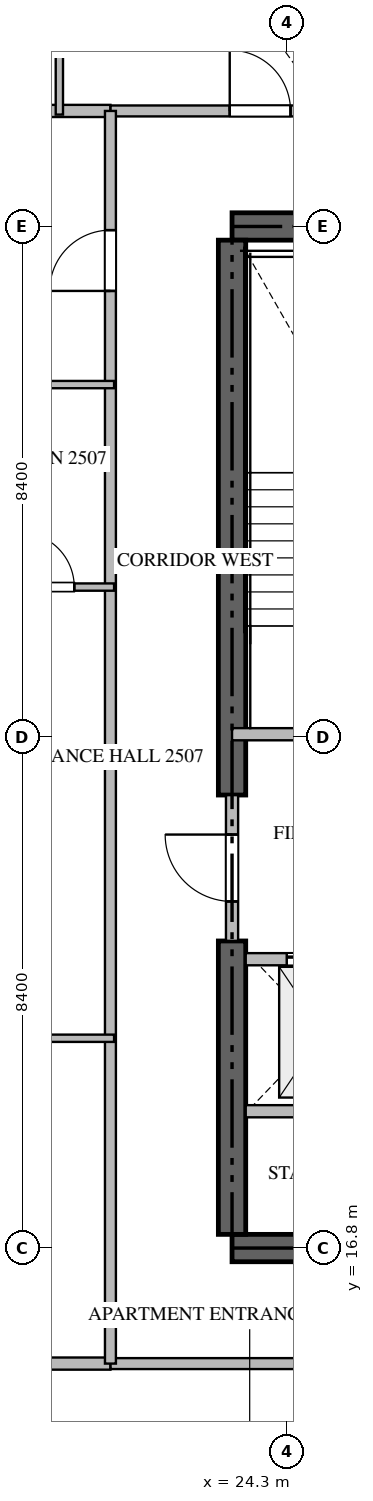
"""IFC4 building model, lengths in metres.
Left out: names, types, materials, properties, quantities, classifications, styles, units other than length and angle.
Written with IfcOpenShell. Run it as: python <this file> out.ifc"""

import sys

from ifc_helpers import new_model, si_unit, direction, frame, frame_2d, origin, place, context, subcontext, project, spatial, rectangle, extrude, source, transform, mapped, element, fill, save


model = new_model("IFC4")
c1 = context("Model", 3, precision=1e-05, world=origin(), true_north=direction((0.0, 1.0)))
c2 = subcontext(c1, "Body", "Model", "MODEL_VIEW")
j1 = project(units=[si_unit("LENGTHUNIT", "METRE"), si_unit("PLANEANGLEUNIT", "RADIAN")], contexts=[c1])
p1 = place(None, origin())
s1 = spatial("IfcSite", under=j1, at=p1, CompositionType="ELEMENT")
p2 = place(p1, origin())
s2 = spatial("IfcBuilding", under=s1, at=p2, CompositionType="ELEMENT")
p3 = place(p2, frame((0.0, 0.0, 101.7)))
s3 = spatial("IfcBuildingStorey", under=s2, at=p3, CompositionType="ELEMENT", Elevation=101.7)
for number, where, z_axis, x_axis in (
    (1, (23.4, 16.8, -0.26), (0.0, 0.0, 1.0), (1.0, 0.0, 0.0)),
    (2, (41.4, 33.6, -0.26), (0.0, 0.0, 1.0), (-1.0, 0.0, 0.0)),
):
    element("IfcWall", number, at=place(p3, frame(where, z_axis=z_axis, x_axis=x_axis)), inside=s3, PredefinedType="SHEAR", context=c2, shape_type="SweptSolid", body=[
        extrude(rectangle(XDim=18.0, YDim=0.45, at=frame_2d((9.0, 0.0))), origin(), (0.0, 0.0, 1.0), 3.748),
    ])
p4 = place(p3, frame((23.4, 17.025, -0.26), z_axis=(0.0, 0.0, 1.0), x_axis=(0.0, 1.0, 0.0)))
e3 = element("IfcWall", 3, at=p4, inside=s3, PredefinedType="SHEAR", context=c2, shape_type="SweptSolid", body=[
    extrude(rectangle(XDim=4.825, YDim=0.45, at=frame_2d((2.413, 0.0))), origin(), (0.0, 0.0, 1.0), 3.748),
])
p5 = place(p3, frame((23.4, 24.25, -0.26), z_axis=(0.0, 0.0, 1.0), x_axis=(0.0, 1.0, 0.0)))
e4 = element("IfcWall", 4, at=p5, inside=s3, PredefinedType="SHEAR", context=c2, shape_type="SweptSolid", body=[
    extrude(rectangle(XDim=9.125, YDim=0.45, at=frame_2d((4.562, 0.0))), origin(), (0.0, 0.0, 1.0), 3.748),
])
p6 = place(p3, frame((23.4, 25.25, 0.0), z_axis=(0.0, 0.0, 1.0), x_axis=(1.0, 0.0, 0.0)))
e5 = element("IfcWall", 5, at=p6, inside=s3, PredefinedType="STANDARD", context=c2, shape_type="SweptSolid", body=[
    extrude(rectangle(XDim=4.45, YDim=0.2, at=frame_2d((2.225, 0.0))), origin(), (0.0, 0.0, 1.0), 3.49),
])
p7 = place(p6, frame((1.65, 0.0, 0.0)))
e6 = element("IfcOpeningElement", 6, at=p7, cuts=e5, PredefinedType="OPENING", context=c2, shape_type="SweptSolid", body=[
    extrude(rectangle(XDim=1.1, YDim=2.15, at=frame_2d((0.55, 1.075))), frame((0.0, 0.11, 0.0), z_axis=(0.0, -1.0, 0.0), x_axis=(1.0, 0.0, 0.0)), (0.0, 0.0, 1.0), 0.22),
])
p8 = place(p3, frame((23.625, 21.55, 0.0), z_axis=(0.0, 0.0, 1.0), x_axis=(1.0, 0.0, 0.0)))
e7 = element("IfcWall", 7, at=p8, inside=s3, PredefinedType="STANDARD", context=c2, shape_type="SweptSolid", body=[
    extrude(rectangle(XDim=2.425, YDim=0.2, at=frame_2d((1.212, 0.0))), origin(), (0.0, 0.0, 1.0), 3.49),
])
p9 = place(p8, frame((0.675, 0.0, 0.0)))
e8 = element("IfcOpeningElement", 8, at=p9, cuts=e7, PredefinedType="OPENING", context=c2, shape_type="SweptSolid", body=[
    extrude(rectangle(XDim=1.2, YDim=2.2, at=frame_2d((0.6, 1.1))), frame((0.0, 0.11, 0.0), z_axis=(0.0, -1.0, 0.0), x_axis=(1.0, 0.0, 0.0)), (0.0, 0.0, 1.0), 0.22),
])
p10 = place(p3, frame((23.625, 19.05, 0.0), z_axis=(0.0, 0.0, 1.0), x_axis=(1.0, 0.0, 0.0)))
e9 = element("IfcWall", 9, at=p10, inside=s3, PredefinedType="STANDARD", context=c2, shape_type="SweptSolid", body=[
    extrude(rectangle(XDim=2.425, YDim=0.2, at=frame_2d((1.212, 0.0))), origin(), (0.0, 0.0, 1.0), 3.49),
])
p11 = place(p3, frame((23.4, 21.852, 0.0), z_axis=(0.0, 0.0, 1.0), x_axis=(0.0, 1.0, 0.0)))
e10 = element("IfcWall", 10, at=p11, inside=s3, PredefinedType="STANDARD", context=c2, shape_type="SweptSolid", body=[
    extrude(rectangle(XDim=2.396, YDim=0.2, at=frame_2d((1.198, 0.0))), origin(), (0.0, 0.0, 1.0), 3.49),
])
p12 = place(p11, frame((0.648, 0.0, 0.0)))
e11 = element("IfcOpeningElement", 11, at=p12, cuts=e10, PredefinedType="OPENING", context=c2, shape_type="SweptSolid", body=[
    extrude(rectangle(XDim=1.1, YDim=2.15, at=frame_2d((0.55, 1.075))), frame((0.0, 0.11, 0.0), z_axis=(0.0, -1.0, 0.0), x_axis=(1.0, 0.0, 0.0)), (0.0, 0.0, 1.0), 0.22),
])
for number, where, z_axis, x_axis in (
    (12, (6.082, 14.9, 0.0), (0.0, 0.0, 1.0), (1.0, 0.0, 0.0)),
    (13, (6.082, 35.5, 0.0), (0.0, 0.0, 1.0), (1.0, 0.0, 0.0)),
):
    element("IfcWall", number, at=place(p3, frame(where, z_axis=z_axis, x_axis=x_axis)), inside=s3, PredefinedType="PARTITIONING", context=c2, shape_type="SweptSolid", body=[
        extrude(rectangle(XDim=15.318, YDim=0.2, at=frame_2d((7.659, 0.0))), origin(), (0.0, 0.0, 1.0), 3.49),
    ])
p13 = place(p3, frame((21.402, 14.9, 0.0), z_axis=(0.0, 0.0, 1.0), x_axis=(1.0, 0.0, 0.0)))
e14 = element("IfcWall", 14, at=p13, inside=s3, PredefinedType="PARTITIONING", context=c2, shape_type="SweptSolid", body=[
    extrude(rectangle(XDim=21.996, YDim=0.18, at=frame_2d((10.998, 0.0))), origin(), (0.0, 0.0, 1.0), 3.49),
])
p14 = place(p13, frame((10.351, 0.0, 0.0)))
e15 = element("IfcOpeningElement", 15, at=p14, cuts=e14, PredefinedType="OPENING", context=c2, shape_type="SweptSolid", body=[
    extrude(rectangle(XDim=1.0, YDim=2.15, at=frame_2d((0.5, 1.075))), frame((0.0, 0.1, 0.0), z_axis=(0.0, -1.0, 0.0), x_axis=(1.0, 0.0, 0.0)), (0.0, 0.0, 1.0), 0.2),
])
p15 = place(p13, frame((15.978, 0.0, 0.0)))
e16 = element("IfcOpeningElement", 16, at=p15, cuts=e14, PredefinedType="OPENING", context=c2, shape_type="SweptSolid", body=[
    extrude(rectangle(XDim=1.0, YDim=2.15, at=frame_2d((0.5, 1.075))), frame((0.0, 0.1, 0.0), z_axis=(0.0, -1.0, 0.0), x_axis=(1.0, 0.0, 0.0)), (0.0, 0.0, 1.0), 0.2),
])
p16 = place(p3, frame((21.402, 35.5, 0.0), z_axis=(0.0, 0.0, 1.0), x_axis=(1.0, 0.0, 0.0)))
e17 = element("IfcWall", 17, at=p16, inside=s3, PredefinedType="PARTITIONING", context=c2, shape_type="SweptSolid", body=[
    extrude(rectangle(XDim=21.996, YDim=0.18, at=frame_2d((10.998, 0.0))), origin(), (0.0, 0.0, 1.0), 3.49),
])
p17 = place(p16, frame((1.96, 0.0, 0.0)))
e18 = element("IfcOpeningElement", 18, at=p17, cuts=e17, PredefinedType="OPENING", context=c2, shape_type="SweptSolid", body=[
    extrude(rectangle(XDim=1.0, YDim=2.15, at=frame_2d((0.5, 1.075))), frame((0.0, 0.1, 0.0), z_axis=(0.0, -1.0, 0.0), x_axis=(1.0, 0.0, 0.0)), (0.0, 0.0, 1.0), 0.2),
])
p18 = place(p16, frame((5.249, 0.0, 0.0)))
e19 = element("IfcOpeningElement", 19, at=p18, cuts=e17, PredefinedType="OPENING", context=c2, shape_type="SweptSolid", body=[
    extrude(rectangle(XDim=1.0, YDim=2.15, at=frame_2d((0.5, 1.075))), frame((0.0, 0.1, 0.0), z_axis=(0.0, -1.0, 0.0), x_axis=(1.0, 0.0, 0.0)), (0.0, 0.0, 1.0), 0.2),
])
p19 = place(p16, frame((11.653, 0.0, 0.0)))
e20 = element("IfcOpeningElement", 20, at=p19, cuts=e17, PredefinedType="OPENING", context=c2, shape_type="SweptSolid", body=[
    extrude(rectangle(XDim=1.0, YDim=2.15, at=frame_2d((0.5, 1.075))), frame((0.0, 0.1, 0.0), z_axis=(0.0, -1.0, 0.0), x_axis=(1.0, 0.0, 0.0)), (0.0, 0.0, 1.0), 0.2),
])
p20 = place(p16, frame((18.896, 0.0, 0.0)))
e21 = element("IfcOpeningElement", 21, at=p20, cuts=e17, PredefinedType="OPENING", context=c2, shape_type="SweptSolid", body=[
    extrude(rectangle(XDim=1.0, YDim=2.15, at=frame_2d((0.5, 1.075))), frame((0.0, 0.1, 0.0), z_axis=(0.0, -1.0, 0.0), x_axis=(1.0, 0.0, 0.0)), (0.0, 0.0, 1.0), 0.2),
])
p21 = place(p3, frame((21.4, 14.9, 0.0), z_axis=(0.0, 0.0, 1.0), x_axis=(0.0, 1.0, 0.0)))
e22 = element("IfcWall", 22, at=p21, inside=s3, PredefinedType="PARTITIONING", context=c2, shape_type="SweptSolid", body=[
    extrude(rectangle(XDim=20.6, YDim=0.18, at=frame_2d((10.3, 0.0))), origin(), (0.0, 0.0, 1.0), 3.49),
])
p22 = place(p21, frame((17.64, 0.0, 0.0)))
e23 = element("IfcOpeningElement", 23, at=p22, cuts=e22, PredefinedType="OPENING", context=c2, shape_type="SweptSolid", body=[
    extrude(rectangle(XDim=1.0, YDim=2.15, at=frame_2d((0.5, 1.075))), frame((0.0, 0.1, 0.0), z_axis=(0.0, -1.0, 0.0), x_axis=(1.0, 0.0, 0.0)), (0.0, 0.0, 1.0), 0.2),
])
for number, where, z_axis, x_axis in (
    (24, (20.56, 38.25, 0.0), (0.0, 0.0, 1.0), (0.0, -1.0, 0.0)),
    (25, (18.65, 31.0, 0.0), (0.0, 0.0, 1.0), (1.0, 0.0, 0.0)),
):
    element("IfcWall", number, at=place(p3, frame(where, z_axis=z_axis, x_axis=x_axis)), inside=s3, PredefinedType="PARTITIONING", context=c2, shape_type="SweptSolid", body=[
        extrude(rectangle(XDim=2.81, YDim=0.12, at=frame_2d((1.405, 0.0))), origin(), (0.0, 0.0, 1.0), 3.49),
    ])
p23 = place(p3, frame((19.25, 27.67, 0.0), z_axis=(0.0, 0.0, 1.0), x_axis=(1.0, 0.0, 0.0)))
e26 = element("IfcWall", 26, at=p23, inside=s3, PredefinedType="PARTITIONING", context=c2, shape_type="SweptSolid", body=[
    extrude(rectangle(XDim=2.21, YDim=0.12, at=frame_2d((1.105, 0.0))), origin(), (0.0, 0.0, 1.0), 3.49),
])
p24 = place(p23, frame((0.655, 0.0, 0.0)))
e27 = element("IfcOpeningElement", 27, at=p24, cuts=e26, PredefinedType="OPENING", context=c2, shape_type="SweptSolid", body=[
    extrude(rectangle(XDim=0.9, YDim=2.1, at=frame_2d((0.45, 1.05))), frame((0.0, 0.07, 0.0), z_axis=(0.0, -1.0, 0.0), x_axis=(1.0, 0.0, 0.0)), (0.0, 0.0, 1.0), 0.14),
])
p25 = place(p3, frame((19.252, 20.25, 0.0), z_axis=(0.0, 0.0, 1.0), x_axis=(1.0, 0.0, 0.0)))
e28 = element("IfcWall", 28, at=p25, inside=s3, PredefinedType="PARTITIONING", context=c2, shape_type="SweptSolid", body=[
    extrude(rectangle(XDim=2.208, YDim=0.12, at=frame_2d((1.104, 0.0))), origin(), (0.0, 0.0, 1.0), 3.49),
])
m1 = source(origin(), c2, "Body", "SweptSolid", [
    extrude(rectangle(XDim=1.2, YDim=2.2, at=frame_2d((0.6, 1.1))), frame((0.0, 0.025, 0.0), z_axis=(0.0, -1.0, 0.0), x_axis=(1.0, 0.0, 0.0)), (0.0, 0.0, 1.0), 0.05),
])
p26 = place(p9, origin())
e29 = element("IfcDoor", 29, at=p26, inside=s3, OperationType="DOUBLE_DOOR_SLIDING", PredefinedType="DOOR", context=c2, shape_type="MappedRepresentation", body=[
    mapped(m1, transform((0.0, 0.0, 0.0), scale=1.0)),
])
fill(e8, e29)
m2 = source(origin(), c2, "Body", "SweptSolid", [
    extrude(rectangle(XDim=1.1, YDim=2.15, at=frame_2d((0.55, 1.075))), frame((0.0, 0.025, 0.0), z_axis=(0.0, -1.0, 0.0), x_axis=(1.0, 0.0, 0.0)), (0.0, 0.0, 1.0), 0.05),
])
p27 = place(p12, origin())
e30 = element("IfcDoor", 30, at=p27, inside=s3, OperationType="SINGLE_SWING_RIGHT", PredefinedType="DOOR", context=c2, shape_type="MappedRepresentation", body=[
    mapped(m2, transform((0.0, 0.0, 0.0), scale=1.0)),
])
fill(e11, e30)
m3 = source(origin(), c2, "Body", "SweptSolid", [
    extrude(rectangle(XDim=1.0, YDim=2.15, at=frame_2d((0.5, 1.075))), frame((0.0, 0.025, 0.0), z_axis=(0.0, -1.0, 0.0), x_axis=(1.0, 0.0, 0.0)), (0.0, 0.0, 1.0), 0.05),
])
p28 = place(p17, origin())
e31 = element("IfcDoor", 31, at=p28, inside=s3, OperationType="SINGLE_SWING_LEFT", PredefinedType="DOOR", context=c2, shape_type="MappedRepresentation", body=[
    mapped(m3, transform((0.0, 0.0, 0.0), scale=1.0)),
])
fill(e18, e31)
p29 = place(p22, origin())
e32 = element("IfcDoor", 32, at=p29, inside=s3, OperationType="SINGLE_SWING_LEFT", PredefinedType="DOOR", context=c2, shape_type="MappedRepresentation", body=[
    mapped(m3, transform((0.0, 0.0, 0.0), scale=1.0)),
])
fill(e23, e32)
m4 = source(origin(), c2, "Body", "SweptSolid", [
    extrude(rectangle(XDim=0.9, YDim=2.1, at=frame_2d((0.45, 1.05))), frame((0.0, 0.025, 0.0), z_axis=(0.0, -1.0, 0.0), x_axis=(1.0, 0.0, 0.0)), (0.0, 0.0, 1.0), 0.05),
])
p30 = place(p24, origin())
e33 = element("IfcDoor", 33, at=p30, inside=s3, OperationType="SINGLE_SWING_LEFT", PredefinedType="DOOR", context=c2, shape_type="MappedRepresentation", body=[
    mapped(m4, transform((0.0, 0.0, 0.0), scale=1.0)),
])
fill(e27, e33)
save(model, sys.argv[1])
